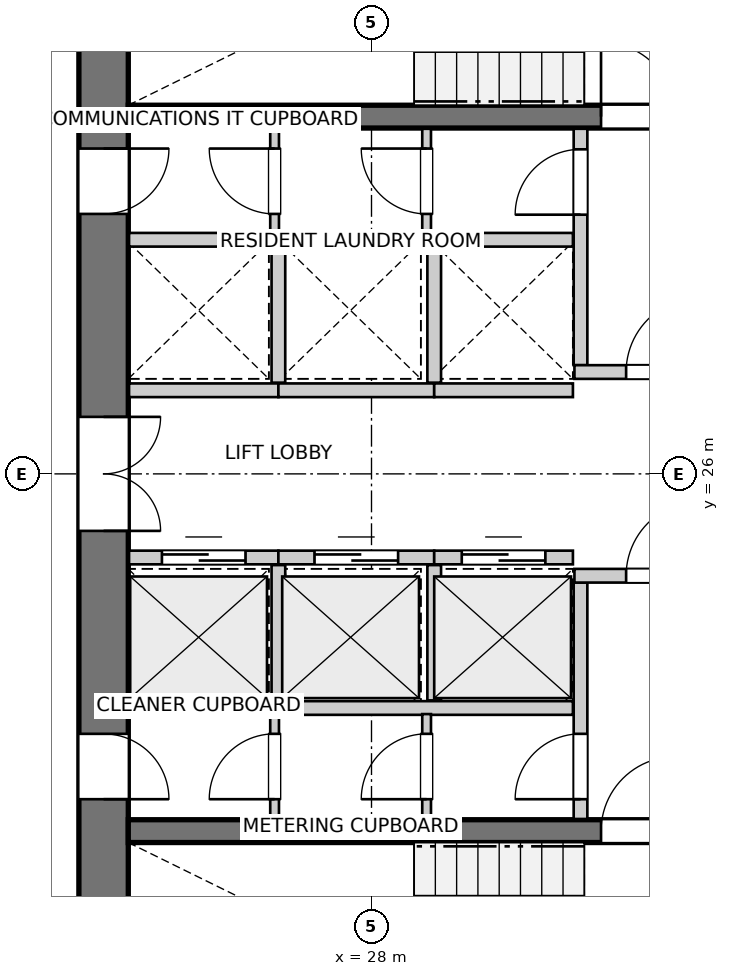
"""IFC4 building model, lengths in metres.
Left out: names, types, materials, properties, quantities, classifications, styles, units other than length and angle.
Written with IfcOpenShell. Run it as: python <this file> out.ifc"""

import sys

from ifc_helpers import new_model, si_unit, direction, frame, frame_2d, origin, place, context, subcontext, project, spatial, rectangle, extrude, source, transform, mapped, element, fill, save


model = new_model("IFC4")
c1 = context("Model", 3, precision=1e-05, world=origin(), true_north=direction((0.0, 1.0)))
c2 = subcontext(c1, "Body", "Model", "MODEL_VIEW")
j1 = project(units=[si_unit("LENGTHUNIT", "METRE"), si_unit("PLANEANGLEUNIT", "RADIAN")], contexts=[c1])
p1 = place(None, origin())
s1 = spatial("IfcSite", under=j1, at=p1, CompositionType="ELEMENT")
p2 = place(p1, origin())
s2 = spatial("IfcBuilding", under=s1, at=p2, CompositionType="ELEMENT")
p3 = place(p2, frame((0.0, 0.0, 121.6)))
s3 = spatial("IfcBuildingStorey", under=s2, at=p3, CompositionType="ELEMENT", Elevation=121.6)
p4 = place(p3, frame((24.475, 33.8, 0.0), z_axis=(0.0, 0.0, 1.0), x_axis=(0.0, -1.0, 0.0)))
e1 = element("IfcWall", 1, at=p4, inside=s3, PredefinedType="SHEAR", context=c2, shape_type="SweptSolid", body=[
    extrude(rectangle(XDim=15.6, YDim=0.65, at=frame_2d((7.8, 0.0))), origin(), (0.0, 0.0, 1.0), 2.95),
])
p5 = place(p4, frame((7.05, 0.0, 0.0)))
e2 = element("IfcOpeningElement", 2, at=p5, cuts=e1, PredefinedType="OPENING", context=c2, shape_type="SweptSolid", body=[
    extrude(rectangle(XDim=1.5, YDim=2.15, at=frame_2d((0.75, 1.075))), frame((0.0, 0.335, 0.0), z_axis=(0.0, -1.0, 0.0), x_axis=(1.0, 0.0, 0.0)), (0.0, 0.0, 1.0), 0.67),
])
p6 = place(p4, frame((3.52, 0.0, 0.0)))
e3 = element("IfcOpeningElement", 3, at=p6, cuts=e1, PredefinedType="OPENING", context=c2, shape_type="SweptSolid", body=[
    extrude(rectangle(XDim=0.86, YDim=2.05, at=frame_2d((0.43, 1.025))), frame((0.0, 0.335, 0.0), z_axis=(0.0, -1.0, 0.0), x_axis=(1.0, 0.0, 0.0)), (0.0, 0.0, 1.0), 0.67),
])
p7 = place(p4, frame((11.22, 0.0, 0.0)))
e4 = element("IfcOpeningElement", 4, at=p7, cuts=e1, PredefinedType="OPENING", context=c2, shape_type="SweptSolid", body=[
    extrude(rectangle(XDim=0.86, YDim=2.05, at=frame_2d((0.43, 1.025))), frame((0.0, 0.335, 0.0), z_axis=(0.0, -1.0, 0.0), x_axis=(1.0, 0.0, 0.0)), (0.0, 0.0, 1.0), 0.67),
])
p8 = place(p3, frame((24.8, 21.3, 0.0), z_axis=(0.0, 0.0, 1.0), x_axis=(1.0, 0.0, 0.0)))
e5 = element("IfcWall", 5, at=p8, inside=s3, PredefinedType="SHEAR", context=c2, shape_type="SweptSolid", body=[
    extrude(rectangle(XDim=11.1, YDim=0.3, at=frame_2d((5.55, 0.0))), origin(), (0.0, 0.0, 1.0), 2.95),
])
p9 = place(p8, frame((6.22, 0.0, 0.0)))
e6 = element("IfcOpeningElement", 6, at=p9, cuts=e5, PredefinedType="OPENING", context=c2, shape_type="SweptSolid", body=[
    extrude(rectangle(XDim=0.98, YDim=2.15, at=frame_2d((0.49, 1.075))), frame((0.0, 0.16, 0.0), z_axis=(0.0, -1.0, 0.0), x_axis=(1.0, 0.0, 0.0)), (0.0, 0.0, 1.0), 0.32),
])
p10 = place(p8, frame((9.15, 0.0, 0.0)))
e7 = element("IfcOpeningElement", 7, at=p10, cuts=e5, PredefinedType="OPENING", context=c2, shape_type="SweptSolid", body=[
    extrude(rectangle(XDim=1.15, YDim=2.15, at=frame_2d((0.575, 1.075))), frame((0.0, 0.16, 0.0), z_axis=(0.0, -1.0, 0.0), x_axis=(1.0, 0.0, 0.0)), (0.0, 0.0, 1.0), 0.32),
])
p11 = place(p3, frame((24.8, 30.7, 0.0), z_axis=(0.0, 0.0, 1.0), x_axis=(1.0, 0.0, 0.0)))
e8 = element("IfcWall", 8, at=p11, inside=s3, PredefinedType="SHEAR", context=c2, shape_type="SweptSolid", body=[
    extrude(rectangle(XDim=11.1, YDim=0.3, at=frame_2d((5.55, 0.0))), origin(), (0.0, 0.0, 1.0), 2.95),
])
p12 = place(p11, frame((6.22, 0.0, 0.0)))
e9 = element("IfcOpeningElement", 9, at=p12, cuts=e8, PredefinedType="OPENING", context=c2, shape_type="SweptSolid", body=[
    extrude(rectangle(XDim=0.98, YDim=2.15, at=frame_2d((0.49, 1.075))), frame((0.0, 0.16, 0.0), z_axis=(0.0, -1.0, 0.0), x_axis=(1.0, 0.0, 0.0)), (0.0, 0.0, 1.0), 0.32),
])
p13 = place(p11, frame((9.15, 0.0, 0.0)))
e10 = element("IfcOpeningElement", 10, at=p13, cuts=e8, PredefinedType="OPENING", context=c2, shape_type="SweptSolid", body=[
    extrude(rectangle(XDim=1.15, YDim=2.15, at=frame_2d((0.575, 1.075))), frame((0.0, 0.16, 0.0), z_axis=(0.0, -1.0, 0.0), x_axis=(1.0, 0.0, 0.0)), (0.0, 0.0, 1.0), 0.32),
])
p14 = place(p3, frame((30.75, 21.46, 0.0), z_axis=(0.0, 0.0, 1.0), x_axis=(0.0, 1.0, 0.0)))
e11 = element("IfcWall", 11, at=p14, inside=s3, PredefinedType="PARTITIONING", context=c2, shape_type="SweptSolid", body=[
    extrude(rectangle(XDim=3.11, YDim=0.18, at=frame_2d((1.555, 0.0))), origin(), (0.0, 0.0, 1.0), 2.95),
])
p15 = place(p14, frame((0.26, 0.0, 0.0)))
e12 = element("IfcOpeningElement", 12, at=p15, cuts=e11, PredefinedType="OPENING", context=c2, shape_type="SweptSolid", body=[
    extrude(rectangle(XDim=0.86, YDim=2.05, at=frame_2d((0.43, 1.025))), frame((0.0, 0.1, 0.0), z_axis=(0.0, -1.0, 0.0), x_axis=(1.0, 0.0, 0.0)), (0.0, 0.0, 1.0), 0.2),
])
p16 = place(p3, frame((30.67, 24.66, 0.0), z_axis=(0.0, 0.0, 1.0), x_axis=(1.0, 0.0, 0.0)))
e13 = element("IfcWall", 13, at=p16, inside=s3, PredefinedType="PARTITIONING", context=c2, shape_type="SweptSolid", body=[
    extrude(rectangle(XDim=5.22, YDim=0.18, at=frame_2d((2.61, 0.0))), origin(), (0.0, 0.0, 1.0), 2.95),
])
p17 = place(p16, frame((0.68, 0.0, 0.0)))
e14 = element("IfcOpeningElement", 14, at=p17, cuts=e13, PredefinedType="OPENING", context=c2, shape_type="SweptSolid", body=[
    extrude(rectangle(XDim=0.98, YDim=2.15, at=frame_2d((0.49, 1.075))), frame((0.0, 0.1, 0.0), z_axis=(0.0, -1.0, 0.0), x_axis=(1.0, 0.0, 0.0)), (0.0, 0.0, 1.0), 0.2),
])
p18 = place(p3, frame((30.75, 27.43, 0.0), z_axis=(0.0, 0.0, 1.0), x_axis=(0.0, 1.0, 0.0)))
e15 = element("IfcWall", 15, at=p18, inside=s3, PredefinedType="PARTITIONING", context=c2, shape_type="SweptSolid", body=[
    extrude(rectangle(XDim=3.11, YDim=0.18, at=frame_2d((1.555, 0.0))), origin(), (0.0, 0.0, 1.0), 2.95),
])
p19 = place(p18, frame((1.98, 0.0, 0.0)))
e16 = element("IfcOpeningElement", 16, at=p19, cuts=e15, PredefinedType="OPENING", context=c2, shape_type="SweptSolid", body=[
    extrude(rectangle(XDim=0.86, YDim=2.05, at=frame_2d((0.43, 1.025))), frame((0.0, 0.1, 0.0), z_axis=(0.0, -1.0, 0.0), x_axis=(1.0, 0.0, 0.0)), (0.0, 0.0, 1.0), 0.2),
])
p20 = place(p3, frame((30.67, 27.34, 0.0), z_axis=(0.0, 0.0, 1.0), x_axis=(1.0, 0.0, 0.0)))
e17 = element("IfcWall", 17, at=p20, inside=s3, PredefinedType="PARTITIONING", context=c2, shape_type="SweptSolid", body=[
    extrude(rectangle(XDim=5.22, YDim=0.18, at=frame_2d((2.61, 0.0))), origin(), (0.0, 0.0, 1.0), 2.95),
])
p21 = place(p20, frame((0.68, 0.0, 0.0)))
e18 = element("IfcOpeningElement", 18, at=p21, cuts=e17, PredefinedType="OPENING", context=c2, shape_type="SweptSolid", body=[
    extrude(rectangle(XDim=0.98, YDim=2.15, at=frame_2d((0.49, 1.075))), frame((0.0, 0.1, 0.0), z_axis=(0.0, -1.0, 0.0), x_axis=(1.0, 0.0, 0.0)), (0.0, 0.0, 1.0), 0.2),
])
p22 = place(p3, frame((24.81, 22.92, 0.0), z_axis=(0.0, 0.0, 1.0), x_axis=(1.0, 0.0, 0.0)))
e19 = element("IfcWall", 19, at=p22, inside=s3, PredefinedType="PARTITIONING", context=c2, shape_type="SweptSolid", body=[
    extrude(rectangle(XDim=5.84, YDim=0.18, at=frame_2d((2.92, 0.0))), origin(), (0.0, 0.0, 1.0), 2.95),
])
p23 = place(p3, frame((24.81, 24.9, 0.0), z_axis=(0.0, 0.0, 1.0), x_axis=(1.0, 0.0, 0.0)))
e20 = element("IfcWall", 20, at=p23, inside=s3, PredefinedType="PARTITIONING", context=c2, shape_type="SweptSolid", body=[
    extrude(rectangle(XDim=1.965, YDim=0.18, at=frame_2d((0.982, 0.0))), origin(), (0.0, 0.0, 1.0), 2.95),
])
p24 = place(p23, frame((0.433, 0.0, 0.0)))
e21 = element("IfcOpeningElement", 21, at=p24, cuts=e20, PredefinedType="OPENING", context=c2, shape_type="SweptSolid", body=[
    extrude(rectangle(XDim=1.1, YDim=2.15, at=frame_2d((0.55, 1.075))), frame((0.0, 0.1, 0.0), z_axis=(0.0, -1.0, 0.0), x_axis=(1.0, 0.0, 0.0)), (0.0, 0.0, 1.0), 0.2),
])
p25 = place(p3, frame((26.775, 24.9, 0.0), z_axis=(0.0, 0.0, 1.0), x_axis=(1.0, 0.0, 0.0)))
e22 = element("IfcWall", 22, at=p25, inside=s3, PredefinedType="PARTITIONING", context=c2, shape_type="SweptSolid", body=[
    extrude(rectangle(XDim=2.05, YDim=0.18, at=frame_2d((1.025, 0.0))), origin(), (0.0, 0.0, 1.0), 2.95),
])
p26 = place(p25, frame((0.475, 0.0, 0.0)))
e23 = element("IfcOpeningElement", 23, at=p26, cuts=e22, PredefinedType="OPENING", context=c2, shape_type="SweptSolid", body=[
    extrude(rectangle(XDim=1.1, YDim=2.15, at=frame_2d((0.55, 1.075))), frame((0.0, 0.1, 0.0), z_axis=(0.0, -1.0, 0.0), x_axis=(1.0, 0.0, 0.0)), (0.0, 0.0, 1.0), 0.2),
])
p27 = place(p3, frame((26.775, 23.02, 0.0), z_axis=(0.0, 0.0, 1.0), x_axis=(0.0, 1.0, 0.0)))
e24 = element("IfcWall", 24, at=p27, inside=s3, PredefinedType="PARTITIONING", context=c2, shape_type="SweptSolid", body=[
    extrude(rectangle(XDim=1.78, YDim=0.18, at=frame_2d((0.89, 0.0))), origin(), (0.0, 0.0, 1.0), 2.95),
])
p28 = place(p3, frame((28.825, 24.9, 0.0), z_axis=(0.0, 0.0, 1.0), x_axis=(1.0, 0.0, 0.0)))
e25 = element("IfcWall", 25, at=p28, inside=s3, PredefinedType="PARTITIONING", context=c2, shape_type="SweptSolid", body=[
    extrude(rectangle(XDim=1.825, YDim=0.18, at=frame_2d((0.913, 0.0))), origin(), (0.0, 0.0, 1.0), 2.95),
])
p29 = place(p28, frame((0.363, 0.0, 0.0)))
e26 = element("IfcOpeningElement", 26, at=p29, cuts=e25, PredefinedType="OPENING", context=c2, shape_type="SweptSolid", body=[
    extrude(rectangle(XDim=1.1, YDim=2.15, at=frame_2d((0.55, 1.075))), frame((0.0, 0.1, 0.0), z_axis=(0.0, -1.0, 0.0), x_axis=(1.0, 0.0, 0.0)), (0.0, 0.0, 1.0), 0.2),
])
p30 = place(p3, frame((28.825, 23.02, 0.0), z_axis=(0.0, 0.0, 1.0), x_axis=(0.0, 1.0, 0.0)))
e27 = element("IfcWall", 27, at=p30, inside=s3, PredefinedType="PARTITIONING", context=c2, shape_type="SweptSolid", body=[
    extrude(rectangle(XDim=1.78, YDim=0.18, at=frame_2d((0.89, 0.0))), origin(), (0.0, 0.0, 1.0), 2.95),
])
p31 = place(p3, frame((24.81, 29.08, 0.0), z_axis=(0.0, 0.0, 1.0), x_axis=(1.0, 0.0, 0.0)))
e28 = element("IfcWall", 28, at=p31, inside=s3, PredefinedType="PARTITIONING", context=c2, shape_type="SweptSolid", body=[
    extrude(rectangle(XDim=5.84, YDim=0.18, at=frame_2d((2.92, 0.0))), origin(), (0.0, 0.0, 1.0), 2.95),
])
p32 = place(p3, frame((24.81, 27.1, 0.0), z_axis=(0.0, 0.0, 1.0), x_axis=(1.0, 0.0, 0.0)))
e29 = element("IfcWall", 29, at=p32, inside=s3, PredefinedType="PARTITIONING", context=c2, shape_type="SweptSolid", body=[
    extrude(rectangle(XDim=1.965, YDim=0.18, at=frame_2d((0.982, 0.0))), origin(), (0.0, 0.0, 1.0), 2.95),
])
p33 = place(p3, frame((26.775, 27.1, 0.0), z_axis=(0.0, 0.0, 1.0), x_axis=(1.0, 0.0, 0.0)))
e30 = element("IfcWall", 30, at=p33, inside=s3, PredefinedType="PARTITIONING", context=c2, shape_type="SweptSolid", body=[
    extrude(rectangle(XDim=2.05, YDim=0.18, at=frame_2d((1.025, 0.0))), origin(), (0.0, 0.0, 1.0), 2.95),
])
p34 = place(p3, frame((26.775, 27.2, 0.0), z_axis=(0.0, 0.0, 1.0), x_axis=(0.0, 1.0, 0.0)))
e31 = element("IfcWall", 31, at=p34, inside=s3, PredefinedType="PARTITIONING", context=c2, shape_type="SweptSolid", body=[
    extrude(rectangle(XDim=1.78, YDim=0.18, at=frame_2d((0.89, 0.0))), origin(), (0.0, 0.0, 1.0), 2.95),
])
p35 = place(p3, frame((28.825, 27.1, 0.0), z_axis=(0.0, 0.0, 1.0), x_axis=(1.0, 0.0, 0.0)))
e32 = element("IfcWall", 32, at=p35, inside=s3, PredefinedType="PARTITIONING", context=c2, shape_type="SweptSolid", body=[
    extrude(rectangle(XDim=1.825, YDim=0.18, at=frame_2d((0.913, 0.0))), origin(), (0.0, 0.0, 1.0), 2.95),
])
p36 = place(p3, frame((28.825, 27.2, 0.0), z_axis=(0.0, 0.0, 1.0), x_axis=(0.0, 1.0, 0.0)))
e33 = element("IfcWall", 33, at=p36, inside=s3, PredefinedType="PARTITIONING", context=c2, shape_type="SweptSolid", body=[
    extrude(rectangle(XDim=1.78, YDim=0.18, at=frame_2d((0.89, 0.0))), origin(), (0.0, 0.0, 1.0), 2.95),
])
p37 = place(p3, frame((26.725, 21.46, 0.0), z_axis=(0.0, 0.0, 1.0), x_axis=(0.0, 1.0, 0.0)))
e34 = element("IfcWall", 34, at=p37, inside=s3, PredefinedType="PARTITIONING", context=c2, shape_type="SweptSolid", body=[
    extrude(rectangle(XDim=1.38, YDim=0.115, at=frame_2d((0.69, 0.0))), origin(), (0.0, 0.0, 1.0), 2.95),
])
p38 = place(p37, frame((0.26, 0.0, 0.0)))
e35 = element("IfcOpeningElement", 35, at=p38, cuts=e34, PredefinedType="OPENING", context=c2, shape_type="SweptSolid", body=[
    extrude(rectangle(XDim=0.86, YDim=2.05, at=frame_2d((0.43, 1.025))), frame((0.0, 0.067, 0.0), z_axis=(0.0, -1.0, 0.0), x_axis=(1.0, 0.0, 0.0)), (0.0, 0.0, 1.0), 0.135),
])
p39 = place(p3, frame((26.725, 29.16, 0.0), z_axis=(0.0, 0.0, 1.0), x_axis=(0.0, 1.0, 0.0)))
e36 = element("IfcWall", 36, at=p39, inside=s3, PredefinedType="PARTITIONING", context=c2, shape_type="SweptSolid", body=[
    extrude(rectangle(XDim=1.38, YDim=0.115, at=frame_2d((0.69, 0.0))), origin(), (0.0, 0.0, 1.0), 2.95),
])
p40 = place(p39, frame((0.26, 0.0, 0.0)))
e37 = element("IfcOpeningElement", 37, at=p40, cuts=e36, PredefinedType="OPENING", context=c2, shape_type="SweptSolid", body=[
    extrude(rectangle(XDim=0.86, YDim=2.05, at=frame_2d((0.43, 1.025))), frame((0.0, 0.067, 0.0), z_axis=(0.0, -1.0, 0.0), x_axis=(1.0, 0.0, 0.0)), (0.0, 0.0, 1.0), 0.135),
])
p41 = place(p3, frame((28.725, 21.46, 0.0), z_axis=(0.0, 0.0, 1.0), x_axis=(0.0, 1.0, 0.0)))
e38 = element("IfcWall", 38, at=p41, inside=s3, PredefinedType="PARTITIONING", context=c2, shape_type="SweptSolid", body=[
    extrude(rectangle(XDim=1.38, YDim=0.115, at=frame_2d((0.69, 0.0))), origin(), (0.0, 0.0, 1.0), 2.95),
])
p42 = place(p41, frame((0.26, 0.0, 0.0)))
e39 = element("IfcOpeningElement", 39, at=p42, cuts=e38, PredefinedType="OPENING", context=c2, shape_type="SweptSolid", body=[
    extrude(rectangle(XDim=0.86, YDim=2.05, at=frame_2d((0.43, 1.025))), frame((0.0, 0.067, 0.0), z_axis=(0.0, -1.0, 0.0), x_axis=(1.0, 0.0, 0.0)), (0.0, 0.0, 1.0), 0.135),
])
p43 = place(p3, frame((28.725, 29.16, 0.0), z_axis=(0.0, 0.0, 1.0), x_axis=(0.0, 1.0, 0.0)))
e40 = element("IfcWall", 40, at=p43, inside=s3, PredefinedType="PARTITIONING", context=c2, shape_type="SweptSolid", body=[
    extrude(rectangle(XDim=1.38, YDim=0.115, at=frame_2d((0.69, 0.0))), origin(), (0.0, 0.0, 1.0), 2.95),
])
p44 = place(p43, frame((0.26, 0.0, 0.0)))
e41 = element("IfcOpeningElement", 41, at=p44, cuts=e40, PredefinedType="OPENING", context=c2, shape_type="SweptSolid", body=[
    extrude(rectangle(XDim=0.86, YDim=2.05, at=frame_2d((0.43, 1.025))), frame((0.0, 0.067, 0.0), z_axis=(0.0, -1.0, 0.0), x_axis=(1.0, 0.0, 0.0)), (0.0, 0.0, 1.0), 0.135),
])
m1 = source(origin(), c2, "Body", "SweptSolid", [
    extrude(rectangle(XDim=0.98, YDim=2.15, at=frame_2d((0.49, 1.075))), frame((0.0, 0.025, 0.0), z_axis=(0.0, -1.0, 0.0), x_axis=(1.0, 0.0, 0.0)), (0.0, 0.0, 1.0), 0.05),
])
p45 = place(p9, origin())
e42 = element("IfcDoor", 42, at=p45, inside=s3, OperationType="SINGLE_SWING_RIGHT", PredefinedType="DOOR", context=c2, shape_type="MappedRepresentation", body=[
    mapped(m1, transform((0.0, 0.0, 0.0), x_axis=(1.0, 0.0, 0.0), y_axis=(0.0, 1.0, 0.0), z_axis=(0.0, 0.0, 1.0), scale=1.0)),
])
fill(e6, e42)
p46 = place(p12, origin())
e43 = element("IfcDoor", 43, at=p46, inside=s3, OperationType="SINGLE_SWING_LEFT", PredefinedType="DOOR", context=c2, shape_type="MappedRepresentation", body=[
    mapped(m1, transform((0.0, 0.0, 0.0), x_axis=(1.0, 0.0, 0.0), y_axis=(0.0, 1.0, 0.0), z_axis=(0.0, 0.0, 1.0), scale=1.0)),
])
fill(e9, e43)
m2 = source(origin(), c2, "Body", "SweptSolid", [
    extrude(rectangle(XDim=1.5, YDim=2.15, at=frame_2d((0.75, 1.075))), frame((0.0, 0.025, 0.0), z_axis=(0.0, -1.0, 0.0), x_axis=(1.0, 0.0, 0.0)), (0.0, 0.0, 1.0), 0.05),
])
p47 = place(p5, origin())
e44 = element("IfcDoor", 44, at=p47, inside=s3, OperationType="DOUBLE_DOOR_SINGLE_SWING", PredefinedType="DOOR", context=c2, shape_type="MappedRepresentation", body=[
    mapped(m2, transform((0.0, 0.0, 0.0), x_axis=(1.0, 0.0, 0.0), y_axis=(0.0, 1.0, 0.0), z_axis=(0.0, 0.0, 1.0), scale=1.0)),
])
fill(e2, e44)
m3 = source(origin(), c2, "Body", "SweptSolid", [
    extrude(rectangle(XDim=0.86, YDim=2.05, at=frame_2d((0.43, 1.025))), frame((0.0, 0.025, 0.0), z_axis=(0.0, -1.0, 0.0), x_axis=(1.0, 0.0, 0.0)), (0.0, 0.0, 1.0), 0.05),
])
p48 = place(p6, origin())
e45 = element("IfcDoor", 45, at=p48, inside=s3, OperationType="SINGLE_SWING_LEFT", PredefinedType="DOOR", context=c2, shape_type="MappedRepresentation", body=[
    mapped(m3, transform((0.0, 0.0, 0.0), x_axis=(1.0, 0.0, 0.0), y_axis=(0.0, 1.0, 0.0), z_axis=(0.0, 0.0, 1.0), scale=1.0)),
])
fill(e3, e45)
p49 = place(p7, origin())
e46 = element("IfcDoor", 46, at=p49, inside=s3, OperationType="SINGLE_SWING_RIGHT", PredefinedType="DOOR", context=c2, shape_type="MappedRepresentation", body=[
    mapped(m3, transform((0.0, 0.0, 0.0), x_axis=(1.0, 0.0, 0.0), y_axis=(0.0, 1.0, 0.0), z_axis=(0.0, 0.0, 1.0), scale=1.0)),
])
fill(e4, e46)
p50 = place(p15, origin())
e47 = element("IfcDoor", 47, at=p50, inside=s3, OperationType="SINGLE_SWING_LEFT", PredefinedType="DOOR", context=c2, shape_type="MappedRepresentation", body=[
    mapped(m3, transform((0.0, 0.0, 0.0), x_axis=(1.0, 0.0, 0.0), y_axis=(0.0, 1.0, 0.0), z_axis=(0.0, 0.0, 1.0), scale=1.0)),
])
fill(e12, e47)
p51 = place(p17, origin())
e48 = element("IfcDoor", 48, at=p51, inside=s3, OperationType="SINGLE_SWING_RIGHT", PredefinedType="DOOR", context=c2, shape_type="MappedRepresentation", body=[
    mapped(m1, transform((0.0, 0.0, 0.0), x_axis=(1.0, 0.0, 0.0), y_axis=(0.0, 1.0, 0.0), z_axis=(0.0, 0.0, 1.0), scale=1.0)),
])
fill(e14, e48)
p52 = place(p19, origin())
e49 = element("IfcDoor", 49, at=p52, inside=s3, OperationType="SINGLE_SWING_LEFT", PredefinedType="DOOR", context=c2, shape_type="MappedRepresentation", body=[
    mapped(m3, transform((0.0, 0.0, 0.0), x_axis=(1.0, 0.0, 0.0), y_axis=(0.0, 1.0, 0.0), z_axis=(0.0, 0.0, 1.0), scale=1.0)),
])
fill(e16, e49)
p53 = place(p21, origin())
e50 = element("IfcDoor", 50, at=p53, inside=s3, OperationType="SINGLE_SWING_RIGHT", PredefinedType="DOOR", context=c2, shape_type="MappedRepresentation", body=[
    mapped(m1, transform((0.0, 0.0, 0.0), x_axis=(1.0, 0.0, 0.0), y_axis=(0.0, 1.0, 0.0), z_axis=(0.0, 0.0, 1.0), scale=1.0)),
])
fill(e18, e50)
m4 = source(origin(), c2, "Body", "SweptSolid", [
    extrude(rectangle(XDim=1.1, YDim=2.15, at=frame_2d((0.55, 1.075))), frame((0.0, 0.025, 0.0), z_axis=(0.0, -1.0, 0.0), x_axis=(1.0, 0.0, 0.0)), (0.0, 0.0, 1.0), 0.05),
])
p54 = place(p24, origin())
e51 = element("IfcDoor", 51, at=p54, inside=s3, OperationType="DOUBLE_DOOR_SLIDING", PredefinedType="DOOR", context=c2, shape_type="MappedRepresentation", body=[
    mapped(m4, transform((0.0, 0.0, 0.0), x_axis=(1.0, 0.0, 0.0), y_axis=(0.0, 1.0, 0.0), z_axis=(0.0, 0.0, 1.0), scale=1.0)),
])
fill(e21, e51)
p55 = place(p26, origin())
e52 = element("IfcDoor", 52, at=p55, inside=s3, OperationType="DOUBLE_DOOR_SLIDING", PredefinedType="DOOR", context=c2, shape_type="MappedRepresentation", body=[
    mapped(m4, transform((0.0, 0.0, 0.0), x_axis=(1.0, 0.0, 0.0), y_axis=(0.0, 1.0, 0.0), z_axis=(0.0, 0.0, 1.0), scale=1.0)),
])
fill(e23, e52)
p56 = place(p29, origin())
e53 = element("IfcDoor", 53, at=p56, inside=s3, OperationType="DOUBLE_DOOR_SLIDING", PredefinedType="DOOR", context=c2, shape_type="MappedRepresentation", body=[
    mapped(m4, transform((0.0, 0.0, 0.0), x_axis=(1.0, 0.0, 0.0), y_axis=(0.0, 1.0, 0.0), z_axis=(0.0, 0.0, 1.0), scale=1.0)),
])
fill(e26, e53)
p57 = place(p38, origin())
e54 = element("IfcDoor", 54, at=p57, inside=s3, OperationType="SINGLE_SWING_LEFT", PredefinedType="DOOR", context=c2, shape_type="MappedRepresentation", body=[
    mapped(m3, transform((0.0, 0.0, 0.0), x_axis=(1.0, 0.0, 0.0), y_axis=(0.0, 1.0, 0.0), z_axis=(0.0, 0.0, 1.0), scale=1.0)),
])
fill(e35, e54)
p58 = place(p40, origin())
e55 = element("IfcDoor", 55, at=p58, inside=s3, OperationType="SINGLE_SWING_RIGHT", PredefinedType="DOOR", context=c2, shape_type="MappedRepresentation", body=[
    mapped(m3, transform((0.0, 0.0, 0.0), x_axis=(1.0, 0.0, 0.0), y_axis=(0.0, 1.0, 0.0), z_axis=(0.0, 0.0, 1.0), scale=1.0)),
])
fill(e37, e55)
p59 = place(p42, origin())
e56 = element("IfcDoor", 56, at=p59, inside=s3, OperationType="SINGLE_SWING_LEFT", PredefinedType="DOOR", context=c2, shape_type="MappedRepresentation", body=[
    mapped(m3, transform((0.0, 0.0, 0.0), x_axis=(1.0, 0.0, 0.0), y_axis=(0.0, 1.0, 0.0), z_axis=(0.0, 0.0, 1.0), scale=1.0)),
])
fill(e39, e56)
p60 = place(p44, origin())
e57 = element("IfcDoor", 57, at=p60, inside=s3, OperationType="SINGLE_SWING_RIGHT", PredefinedType="DOOR", context=c2, shape_type="MappedRepresentation", body=[
    mapped(m3, transform((0.0, 0.0, 0.0), x_axis=(1.0, 0.0, 0.0), y_axis=(0.0, 1.0, 0.0), z_axis=(0.0, 0.0, 1.0), scale=1.0)),
])
fill(e41, e57)
save(model, sys.argv[1])
